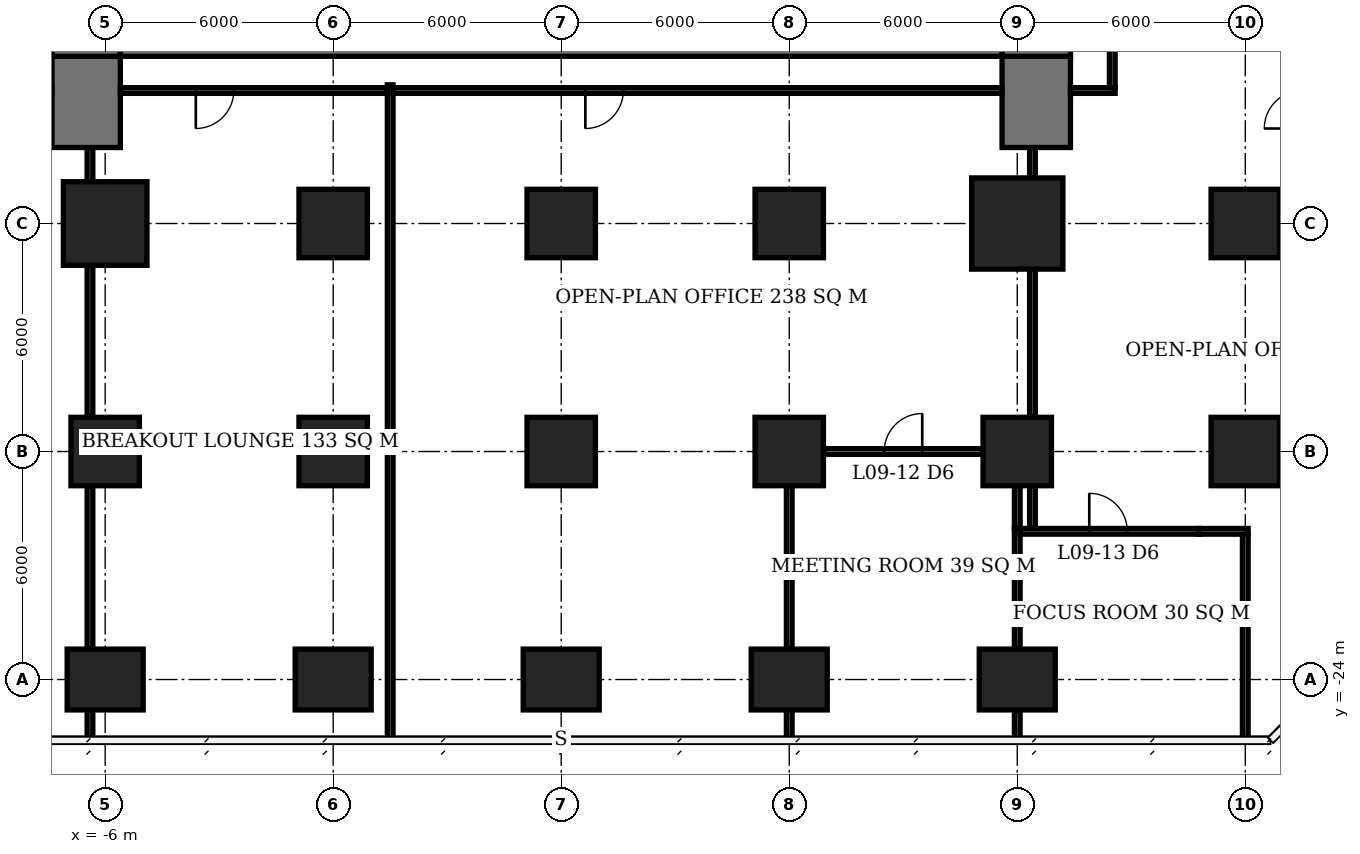
"""IFC4 building model, lengths in metres.
Left out: names, types, materials, properties, quantities, classifications, styles, units other than length and angle.
Written with IfcOpenShell. Run it as: python <this file> out.ifc"""

import sys

from ifc_helpers import new_model, si_unit, direction, frame, frame_2d, origin, origin_2d, place, context, subcontext, project, spatial, rectangle, extrude, element, fill, save


model = new_model("IFC4")
c1 = context("Model", 3, precision=1e-05, world=origin(), true_north=direction((0.0, 1.0)))
c2 = subcontext(c1, "Body", "Model", "MODEL_VIEW")
j1 = project(units=[si_unit("LENGTHUNIT", "METRE"), si_unit("PLANEANGLEUNIT", "RADIAN")], contexts=[c1])
p1 = place(None, origin())
s1 = spatial("IfcSite", under=j1, at=p1, CompositionType="ELEMENT")
p2 = place(p1, origin())
s2 = spatial("IfcBuilding", under=s1, at=p2, CompositionType="ELEMENT")
p3 = place(p2, frame((0.0, 0.0, 41.6)))
s3 = spatial("IfcBuildingStorey", under=s2, at=p3, CompositionType="ELEMENT", Elevation=41.6)
p4 = place(p3, frame((-6.0, -24.0, 0.0), z_axis=(0.0, 0.0, 1.0), x_axis=(1.0, 0.0, 0.0)))
e1 = element("IfcColumn", 1, at=p4, inside=s3, PredefinedType="COLUMN", context=c2, shape_type="SweptSolid", body=[
    extrude(rectangle(XDim=2.0, YDim=1.6, at=origin_2d()), origin(), (0.0, 0.0, 1.0), 3.9),
])
p5 = place(p3, frame((-6.0, -18.0, 0.0), z_axis=(0.0, 0.0, 1.0), x_axis=(1.0, 0.0, 0.0)))
e2 = element("IfcColumn", 2, at=p5, inside=s3, PredefinedType="COLUMN", context=c2, shape_type="SweptSolid", body=[
    extrude(rectangle(XDim=1.8, YDim=1.8, at=origin_2d()), origin(), (0.0, 0.0, 1.0), 3.9),
])
p6 = place(p3, frame((-6.0, -12.0, 0.0), z_axis=(0.0, 0.0, 1.0), x_axis=(1.0, 0.0, 0.0)))
e3 = element("IfcColumn", 3, at=p6, inside=s3, PredefinedType="COLUMN", context=c2, shape_type="SweptSolid", body=[
    extrude(rectangle(XDim=2.2, YDim=2.2, at=origin_2d()), origin(), (0.0, 0.0, 1.0), 3.9),
])
p7 = place(p3, frame((0.0, -24.0, 0.0), z_axis=(0.0, 0.0, 1.0), x_axis=(1.0, 0.0, 0.0)))
e4 = element("IfcColumn", 4, at=p7, inside=s3, PredefinedType="COLUMN", context=c2, shape_type="SweptSolid", body=[
    extrude(rectangle(XDim=2.0, YDim=1.6, at=origin_2d()), origin(), (0.0, 0.0, 1.0), 3.9),
])
for number, where, z_axis, x_axis in (
    (5, (0.0, -18.0, 0.0), (0.0, 0.0, 1.0), (1.0, 0.0, 0.0)),
    (6, (0.0, -12.0, 0.0), (0.0, 0.0, 1.0), (1.0, 0.0, 0.0)),
):
    element("IfcColumn", number, at=place(p3, frame(where, z_axis=z_axis, x_axis=x_axis)), inside=s3, PredefinedType="COLUMN", context=c2, shape_type="SweptSolid", body=[
        extrude(rectangle(XDim=1.8, YDim=1.8, at=origin_2d()), origin(), (0.0, 0.0, 1.0), 3.9),
    ])
p8 = place(p3, frame((6.0, -24.0, 0.0), z_axis=(0.0, 0.0, 1.0), x_axis=(1.0, 0.0, 0.0)))
e7 = element("IfcColumn", 7, at=p8, inside=s3, PredefinedType="COLUMN", context=c2, shape_type="SweptSolid", body=[
    extrude(rectangle(XDim=2.0, YDim=1.6, at=origin_2d()), origin(), (0.0, 0.0, 1.0), 3.9),
])
for number, where, z_axis, x_axis in (
    (8, (6.0, -18.0, 0.0), (0.0, 0.0, 1.0), (1.0, 0.0, 0.0)),
    (9, (6.0, -12.0, 0.0), (0.0, 0.0, 1.0), (1.0, 0.0, 0.0)),
):
    element("IfcColumn", number, at=place(p3, frame(where, z_axis=z_axis, x_axis=x_axis)), inside=s3, PredefinedType="COLUMN", context=c2, shape_type="SweptSolid", body=[
        extrude(rectangle(XDim=1.8, YDim=1.8, at=origin_2d()), origin(), (0.0, 0.0, 1.0), 3.9),
    ])
p9 = place(p3, frame((12.0, -24.0, 0.0), z_axis=(0.0, 0.0, 1.0), x_axis=(1.0, 0.0, 0.0)))
e10 = element("IfcColumn", 10, at=p9, inside=s3, PredefinedType="COLUMN", context=c2, shape_type="SweptSolid", body=[
    extrude(rectangle(XDim=2.0, YDim=1.6, at=origin_2d()), origin(), (0.0, 0.0, 1.0), 3.9),
])
for number, where, z_axis, x_axis in (
    (11, (12.0, -18.0, 0.0), (0.0, 0.0, 1.0), (1.0, 0.0, 0.0)),
    (12, (12.0, -12.0, 0.0), (0.0, 0.0, 1.0), (1.0, 0.0, 0.0)),
):
    element("IfcColumn", number, at=place(p3, frame(where, z_axis=z_axis, x_axis=x_axis)), inside=s3, PredefinedType="COLUMN", context=c2, shape_type="SweptSolid", body=[
        extrude(rectangle(XDim=1.8, YDim=1.8, at=origin_2d()), origin(), (0.0, 0.0, 1.0), 3.9),
    ])
p10 = place(p3, frame((18.0, -24.0, 0.0), z_axis=(0.0, 0.0, 1.0), x_axis=(1.0, 0.0, 0.0)))
e13 = element("IfcColumn", 13, at=p10, inside=s3, PredefinedType="COLUMN", context=c2, shape_type="SweptSolid", body=[
    extrude(rectangle(XDim=2.0, YDim=1.6, at=origin_2d()), origin(), (0.0, 0.0, 1.0), 3.9),
])
p11 = place(p3, frame((18.0, -18.0, 0.0), z_axis=(0.0, 0.0, 1.0), x_axis=(1.0, 0.0, 0.0)))
e14 = element("IfcColumn", 14, at=p11, inside=s3, PredefinedType="COLUMN", context=c2, shape_type="SweptSolid", body=[
    extrude(rectangle(XDim=1.8, YDim=1.8, at=origin_2d()), origin(), (0.0, 0.0, 1.0), 3.9),
])
p12 = place(p3, frame((18.0, -12.0, 0.0), z_axis=(0.0, 0.0, 1.0), x_axis=(1.0, 0.0, 0.0)))
e15 = element("IfcColumn", 15, at=p12, inside=s3, PredefinedType="COLUMN", context=c2, shape_type="SweptSolid", body=[
    extrude(rectangle(XDim=2.4, YDim=2.4, at=origin_2d()), origin(), (0.0, 0.0, 1.0), 3.9),
])
for number, where, z_axis, x_axis in (
    (16, (24.0, -18.0, 0.0), (0.0, 0.0, 1.0), (1.0, 0.0, 0.0)),
    (17, (24.0, -12.0, 0.0), (0.0, 0.0, 1.0), (1.0, 0.0, 0.0)),
):
    element("IfcColumn", number, at=place(p3, frame(where, z_axis=z_axis, x_axis=x_axis)), inside=s3, PredefinedType="COLUMN", context=c2, shape_type="SweptSolid", body=[
        extrude(rectangle(XDim=1.8, YDim=1.8, at=origin_2d()), origin(), (0.0, 0.0, 1.0), 3.9),
    ])
p13 = place(p3, frame((-5.6, -6.6, 0.0), z_axis=(0.0, 0.0, 1.0), x_axis=(1.0, 0.0, 0.0)))
e18 = element("IfcWall", 18, at=p13, inside=s3, PredefinedType="SHEAR", context=c2, shape_type="SweptSolid", body=[
    extrude(rectangle(XDim=23.2, YDim=2.0, at=frame_2d((11.6, 0.0))), origin(), (0.0, 0.0, 1.0), 3.9),
])
p14 = place(p3, frame((-6.5, -7.6, 0.0), z_axis=(0.0, 0.0, 1.0), x_axis=(0.0, 1.0, 0.0)))
e19 = element("IfcWall", 19, at=p14, inside=s3, PredefinedType="SHEAR", context=c2, shape_type="SweptSolid", body=[
    extrude(rectangle(XDim=21.2, YDim=1.8, at=frame_2d((10.6, 0.0))), origin(), (0.0, 0.0, 1.0), 3.9),
])
p15 = place(p14, frame((7.8, 0.0, 0.0)))
e20 = element("IfcOpeningElement", 20, at=p15, cuts=e19, PredefinedType="OPENING", context=c2, shape_type="SweptSolid", body=[
    extrude(rectangle(XDim=1.8, YDim=2.4, at=frame_2d((0.9, 1.2))), frame((0.0, 0.91, 0.0), z_axis=(0.0, -1.0, 0.0), x_axis=(1.0, 0.0, 0.0)), (0.0, 0.0, 1.0), 1.82),
])
p16 = place(p3, frame((18.5, -7.6, 0.0), z_axis=(0.0, 0.0, 1.0), x_axis=(0.0, 1.0, 0.0)))
e21 = element("IfcWall", 21, at=p16, inside=s3, PredefinedType="SHEAR", context=c2, shape_type="SweptSolid", body=[
    extrude(rectangle(XDim=21.2, YDim=1.8, at=frame_2d((10.6, 0.0))), origin(), (0.0, 0.0, 1.0), 3.9),
])
p17 = place(p16, frame((9.2, 0.0, 0.0)))
e22 = element("IfcOpeningElement", 22, at=p17, cuts=e21, PredefinedType="OPENING", context=c2, shape_type="SweptSolid", body=[
    extrude(rectangle(XDim=1.8, YDim=2.4, at=frame_2d((0.9, 1.2))), frame((0.0, 0.91, 0.0), z_axis=(0.0, -1.0, 0.0), x_axis=(1.0, 0.0, 0.0)), (0.0, 0.0, 1.0), 1.82),
])
for number, where, z_axis, x_axis in (
    (23, (-6.5, -10.0, 0.0), (0.0, 0.0, 1.0), (0.0, 1.0, 0.0)),
    (24, (18.5, -10.0, 0.0), (0.0, 0.0, 1.0), (0.0, 1.0, 0.0)),
):
    element("IfcWall", number, at=place(p3, frame(where, z_axis=z_axis, x_axis=x_axis)), inside=s3, PredefinedType="SHEAR", context=c2, shape_type="SweptSolid", body=[
        extrude(rectangle(XDim=2.4, YDim=1.8, at=frame_2d((1.2, 0.0))), origin(), (0.0, 0.0, 1.0), 3.9),
    ])
p18 = place(p3, frame((18.075, -20.1, 0.0), z_axis=(0.0, 0.0, 1.0), x_axis=(1.0, 0.0, 0.0)))
e25 = element("IfcWall", 25, at=p18, inside=s3, PredefinedType="PARTITIONING", context=c2, shape_type="SweptSolid", body=[
    extrude(rectangle(XDim=4.715, YDim=0.15, at=frame_2d((2.357, 0.0))), origin(), (0.0, 0.0, 1.0), 3.65),
])
p19 = place(p18, frame((1.82, 0.0, 0.0)))
e26 = element("IfcOpeningElement", 26, at=p19, cuts=e25, PredefinedType="OPENING", context=c2, shape_type="SweptSolid", body=[
    extrude(rectangle(XDim=1.0, YDim=2.1, at=frame_2d((0.5, 1.05))), frame((0.0, 0.085, 0.0), z_axis=(0.0, -1.0, 0.0), x_axis=(1.0, 0.0, 0.0)), (0.0, 0.0, 1.0), 0.17),
])
p20 = place(p3, frame((22.79, -20.1, 0.0), z_axis=(0.0, 0.0, 1.0), x_axis=(1.0, 0.0, 0.0)))
e27 = element("IfcWall", 27, at=p20, inside=s3, PredefinedType="PARTITIONING", context=c2, shape_type="SweptSolid", body=[
    extrude(rectangle(XDim=1.285, YDim=0.15, at=frame_2d((0.643, 0.0))), origin(), (0.0, 0.0, 1.0), 2.65),
])
p21 = place(p3, frame((12.9, -18.0, 0.0), z_axis=(0.0, 0.0, 1.0), x_axis=(1.0, 0.0, 0.0)))
e28 = element("IfcWall", 28, at=p21, inside=s3, PredefinedType="PARTITIONING", context=c2, shape_type="SweptSolid", body=[
    extrude(rectangle(XDim=4.2, YDim=0.15, at=frame_2d((2.1, 0.0))), origin(), (0.0, 0.0, 1.0), 3.65),
])
p22 = place(p21, frame((1.6, 0.0, 0.0)))
e29 = element("IfcOpeningElement", 29, at=p22, cuts=e28, PredefinedType="OPENING", context=c2, shape_type="SweptSolid", body=[
    extrude(rectangle(XDim=1.0, YDim=2.1, at=frame_2d((0.5, 1.05))), frame((0.0, 0.085, 0.0), z_axis=(0.0, -1.0, 0.0), x_axis=(1.0, 0.0, 0.0)), (0.0, 0.0, 1.0), 0.17),
])
p23 = place(p3, frame((12.0, -25.6, 0.0), z_axis=(0.0, 0.0, 1.0), x_axis=(0.0, 1.0, 0.0)))
e30 = element("IfcWall", 30, at=p23, inside=s3, PredefinedType="PARTITIONING", context=c2, shape_type="SweptSolid", body=[
    extrude(rectangle(XDim=0.8, YDim=0.15, at=frame_2d((0.4, 0.0))), origin(), (0.0, 0.0, 1.0), 3.65),
])
p24 = place(p3, frame((12.0, -23.2, 0.0), z_axis=(0.0, 0.0, 1.0), x_axis=(0.0, 1.0, 0.0)))
e31 = element("IfcWall", 31, at=p24, inside=s3, PredefinedType="PARTITIONING", context=c2, shape_type="SweptSolid", body=[
    extrude(rectangle(XDim=4.3, YDim=0.15, at=frame_2d((2.15, 0.0))), origin(), (0.0, 0.0, 1.0), 3.65),
])
p25 = place(p3, frame((18.0, -25.6, 0.0), z_axis=(0.0, 0.0, 1.0), x_axis=(0.0, 1.0, 0.0)))
e32 = element("IfcWall", 32, at=p25, inside=s3, PredefinedType="PARTITIONING", context=c2, shape_type="SweptSolid", body=[
    extrude(rectangle(XDim=0.8, YDim=0.15, at=frame_2d((0.4, 0.0))), origin(), (0.0, 0.0, 1.0), 3.65),
])
p26 = place(p3, frame((18.0, -23.2, 0.0), z_axis=(0.0, 0.0, 1.0), x_axis=(0.0, 1.0, 0.0)))
e33 = element("IfcWall", 33, at=p26, inside=s3, PredefinedType="PARTITIONING", context=c2, shape_type="SweptSolid", body=[
    extrude(rectangle(XDim=3.175, YDim=0.15, at=frame_2d((1.587, 0.0))), origin(), (0.0, 0.0, 1.0), 3.65),
])
p27 = place(p3, frame((18.0, -20.025, 0.0), z_axis=(0.0, 0.0, 1.0), x_axis=(0.0, 1.0, 0.0)))
e34 = element("IfcWall", 34, at=p27, inside=s3, PredefinedType="PARTITIONING", context=c2, shape_type="SweptSolid", body=[
    extrude(rectangle(XDim=1.125, YDim=0.15, at=frame_2d((0.562, 0.0))), origin(), (0.0, 0.0, 1.0), 3.65),
])
p28 = place(p3, frame((24.0, -25.6, 0.0), z_axis=(0.0, 0.0, 1.0), x_axis=(0.0, 1.0, 0.0)))
e35 = element("IfcWall", 35, at=p28, inside=s3, PredefinedType="PARTITIONING", context=c2, shape_type="SweptSolid", body=[
    extrude(rectangle(XDim=3.555, YDim=0.15, at=frame_2d((1.778, 0.0))), origin(), (0.0, 0.0, 1.0), 3.65),
])
p29 = place(p3, frame((24.0, -22.045, 0.0), z_axis=(0.0, 0.0, 1.0), x_axis=(0.0, 1.0, 0.0)))
e36 = element("IfcWall", 36, at=p29, inside=s3, PredefinedType="PARTITIONING", context=c2, shape_type="SweptSolid", body=[
    extrude(rectangle(XDim=1.87, YDim=0.15, at=frame_2d((0.935, 0.0))), origin(), (0.0, 0.0, 1.0), 2.65),
])
p30 = place(p3, frame((-6.4, -25.55, 0.0), z_axis=(0.0, 0.0, 1.0), x_axis=(0.0, 1.0, 0.0)))
e37 = element("IfcWall", 37, at=p30, inside=s3, PredefinedType="PARTITIONING", context=c2, shape_type="SweptSolid", body=[
    extrude(rectangle(XDim=0.75, YDim=0.15, at=frame_2d((0.375, 0.0))), origin(), (0.0, 0.0, 1.0), 3.65),
])
p31 = place(p3, frame((-6.4, -23.2, 0.0), z_axis=(0.0, 0.0, 1.0), x_axis=(0.0, 1.0, 0.0)))
e38 = element("IfcWall", 38, at=p31, inside=s3, PredefinedType="PARTITIONING", context=c2, shape_type="SweptSolid", body=[
    extrude(rectangle(XDim=4.3, YDim=0.15, at=frame_2d((2.15, 0.0))), origin(), (0.0, 0.0, 1.0), 3.65),
])
p32 = place(p3, frame((-6.4, -17.1, 0.0), z_axis=(0.0, 0.0, 1.0), x_axis=(0.0, 1.0, 0.0)))
e39 = element("IfcWall", 39, at=p32, inside=s3, PredefinedType="PARTITIONING", context=c2, shape_type="SweptSolid", body=[
    extrude(rectangle(XDim=4.0, YDim=0.15, at=frame_2d((2.0, 0.0))), origin(), (0.0, 0.0, 1.0), 3.65),
])
p33 = place(p3, frame((-6.4, -10.9, 0.0), z_axis=(0.0, 0.0, 1.0), x_axis=(0.0, 1.0, 0.0)))
e40 = element("IfcWall", 40, at=p33, inside=s3, PredefinedType="PARTITIONING", context=c2, shape_type="SweptSolid", body=[
    extrude(rectangle(XDim=0.9, YDim=0.15, at=frame_2d((0.45, 0.0))), origin(), (0.0, 0.0, 1.0), 3.65),
])
p34 = place(p3, frame((1.425, -8.5, 0.0), z_axis=(0.0, 0.0, 1.0), x_axis=(-1.0, 0.0, 0.0)))
e41 = element("IfcWall", 41, at=p34, inside=s3, PredefinedType="PARTITIONING", context=c2, shape_type="SweptSolid", body=[
    extrude(rectangle(XDim=7.025, YDim=0.15, at=frame_2d((3.513, 0.0))), origin(), (0.0, 0.0, 1.0), 3.65),
])
p35 = place(p34, frame((4.04, 0.0, 0.0)))
e42 = element("IfcOpeningElement", 42, at=p35, cuts=e41, PredefinedType="OPENING", context=c2, shape_type="SweptSolid", body=[
    extrude(rectangle(XDim=1.0, YDim=2.1, at=frame_2d((0.5, 1.05))), frame((0.0, 0.085, 0.0), z_axis=(0.0, -1.0, 0.0), x_axis=(1.0, 0.0, 0.0)), (0.0, 0.0, 1.0), 0.17),
])
p36 = place(p3, frame((1.5, -25.6, 0.0), z_axis=(0.0, 0.0, 1.0), x_axis=(0.0, 1.0, 0.0)))
e43 = element("IfcWall", 43, at=p36, inside=s3, PredefinedType="PARTITIONING", context=c2, shape_type="SweptSolid", body=[
    extrude(rectangle(XDim=17.25, YDim=0.15, at=frame_2d((8.625, 0.0))), origin(), (0.0, 0.0, 1.0), 3.65),
])
p37 = place(p3, frame((17.6, -8.5, 0.0), z_axis=(0.0, 0.0, 1.0), x_axis=(-1.0, 0.0, 0.0)))
e44 = element("IfcWall", 44, at=p37, inside=s3, PredefinedType="PARTITIONING", context=c2, shape_type="SweptSolid", body=[
    extrude(rectangle(XDim=16.025, YDim=0.15, at=frame_2d((8.013, 0.0))), origin(), (0.0, 0.0, 1.0), 3.65),
])
p38 = place(p37, frame((9.965, 0.0, 0.0)))
e45 = element("IfcOpeningElement", 45, at=p38, cuts=e44, PredefinedType="OPENING", context=c2, shape_type="SweptSolid", body=[
    extrude(rectangle(XDim=1.0, YDim=2.1, at=frame_2d((0.5, 1.05))), frame((0.0, 0.085, 0.0), z_axis=(0.0, -1.0, 0.0), x_axis=(1.0, 0.0, 0.0)), (0.0, 0.0, 1.0), 0.17),
])
p39 = place(p3, frame((18.4, -20.025, 0.0), z_axis=(0.0, 0.0, 1.0), x_axis=(0.0, 1.0, 0.0)))
e46 = element("IfcWall", 46, at=p39, inside=s3, PredefinedType="PARTITIONING", context=c2, shape_type="SweptSolid", body=[
    extrude(rectangle(XDim=1.125, YDim=0.15, at=frame_2d((0.562, 0.0))), origin(), (0.0, 0.0, 1.0), 3.65),
])
p40 = place(p3, frame((18.4, -17.1, 0.0), z_axis=(0.0, 0.0, 1.0), x_axis=(0.0, 1.0, 0.0)))
e47 = element("IfcWall", 47, at=p40, inside=s3, PredefinedType="PARTITIONING", context=c2, shape_type="SweptSolid", body=[
    extrude(rectangle(XDim=3.9, YDim=0.15, at=frame_2d((1.95, 0.0))), origin(), (0.0, 0.0, 1.0), 3.65),
])
p41 = place(p3, frame((18.4, -10.8, 0.0), z_axis=(0.0, 0.0, 1.0), x_axis=(0.0, 1.0, 0.0)))
e48 = element("IfcWall", 48, at=p41, inside=s3, PredefinedType="PARTITIONING", context=c2, shape_type="SweptSolid", body=[
    extrude(rectangle(XDim=0.8, YDim=0.15, at=frame_2d((0.4, 0.0))), origin(), (0.0, 0.0, 1.0), 3.65),
])
p42 = place(p3, frame((19.4, -8.5, 0.0), z_axis=(0.0, 0.0, 1.0), x_axis=(1.0, 0.0, 0.0)))
e49 = element("IfcWall", 49, at=p42, inside=s3, PredefinedType="PARTITIONING", context=c2, shape_type="SweptSolid", body=[
    extrude(rectangle(XDim=1.175, YDim=0.15, at=frame_2d((0.587, 0.0))), origin(), (0.0, 0.0, 1.0), 3.65),
])
p43 = place(p3, frame((20.5, -8.425, 0.0), z_axis=(0.0, 0.0, 1.0), x_axis=(0.0, 1.0, 0.0)))
e50 = element("IfcWall", 50, at=p43, inside=s3, PredefinedType="PARTITIONING", context=c2, shape_type="SweptSolid", body=[
    extrude(rectangle(XDim=3.85, YDim=0.15, at=frame_2d((1.925, 0.0))), origin(), (0.0, 0.0, 1.0), 3.65),
])
p44 = place(p43, frame((2.025, 0.0, 0.0)))
e51 = element("IfcOpeningElement", 51, at=p44, cuts=e50, PredefinedType="OPENING", context=c2, shape_type="SweptSolid", body=[
    extrude(rectangle(XDim=1.0, YDim=2.1, at=frame_2d((0.5, 1.05))), frame((0.0, 0.085, 0.0), z_axis=(0.0, -1.0, 0.0), x_axis=(1.0, 0.0, 0.0)), (0.0, 0.0, 1.0), 0.17),
])
p45 = place(p22, origin())
e52 = element("IfcDoor", 52, at=p45, inside=s3, OperationType="SINGLE_SWING_RIGHT", PredefinedType="DOOR", context=c2, shape_type="SweptSolid", body=[
    extrude(rectangle(XDim=1.0, YDim=2.1, at=frame_2d((0.5, 1.05))), frame((0.0, 0.025, 0.0), z_axis=(0.0, -1.0, 0.0), x_axis=(1.0, 0.0, 0.0)), (0.0, 0.0, 1.0), 0.05),
])
fill(e29, e52)
p46 = place(p19, origin())
e53 = element("IfcDoor", 53, at=p46, inside=s3, OperationType="SINGLE_SWING_LEFT", PredefinedType="DOOR", context=c2, shape_type="SweptSolid", body=[
    extrude(rectangle(XDim=1.0, YDim=2.1, at=frame_2d((0.5, 1.05))), frame((0.0, 0.025, 0.0), z_axis=(0.0, -1.0, 0.0), x_axis=(1.0, 0.0, 0.0)), (0.0, 0.0, 1.0), 0.05),
])
fill(e26, e53)
p47 = place(p35, origin())
e54 = element("IfcDoor", 54, at=p47, inside=s3, OperationType="SINGLE_SWING_RIGHT", PredefinedType="DOOR", context=c2, shape_type="SweptSolid", body=[
    extrude(rectangle(XDim=1.0, YDim=2.1, at=frame_2d((0.5, 1.05))), frame((0.0, 0.025, 0.0), z_axis=(0.0, -1.0, 0.0), x_axis=(1.0, 0.0, 0.0)), (0.0, 0.0, 1.0), 0.05),
])
fill(e42, e54)
p48 = place(p38, origin())
e55 = element("IfcDoor", 55, at=p48, inside=s3, OperationType="SINGLE_SWING_RIGHT", PredefinedType="DOOR", context=c2, shape_type="SweptSolid", body=[
    extrude(rectangle(XDim=1.0, YDim=2.1, at=frame_2d((0.5, 1.05))), frame((0.0, 0.025, 0.0), z_axis=(0.0, -1.0, 0.0), x_axis=(1.0, 0.0, 0.0)), (0.0, 0.0, 1.0), 0.05),
])
fill(e45, e55)
save(model, sys.argv[1])
